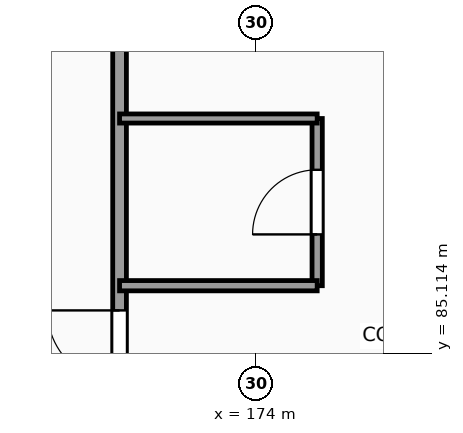
"""IFC4 building model, lengths in metres.
Left out: names, types, materials, properties, quantities, classifications, styles, units other than length and angle.
Written with IfcOpenShell. Run it as: python <this file> out.ifc"""

import sys

from ifc_helpers import new_model, si_unit, direction, frame, frame_2d, origin, place, context, subcontext, project, spatial, rectangle, extrude, element, fill, save


model = new_model("IFC4")
c1 = context("Model", 3, precision=1e-05, world=origin(), true_north=direction((0.0, 1.0)))
c2 = subcontext(c1, "Body", "Model", "MODEL_VIEW")
j1 = project(units=[si_unit("LENGTHUNIT", "METRE"), si_unit("PLANEANGLEUNIT", "RADIAN")], contexts=[c1])
p1 = place(None, origin())
s1 = spatial("IfcSite", under=j1, at=p1, CompositionType="ELEMENT")
p2 = place(p1, origin())
s2 = spatial("IfcBuilding", under=s1, at=p2, CompositionType="ELEMENT")
p3 = place(p2, frame((0.0, 0.0, 24.6)))
s3 = spatial("IfcBuildingStorey", under=s2, at=p3, CompositionType="ELEMENT", Elevation=24.6)
p4 = place(p3, frame((172.2, 42.215, 0.0), z_axis=(0.0, 0.0, 1.0), x_axis=(0.0, 1.0, 0.0)))
e1 = element("IfcWall", 1, at=p4, inside=s3, PredefinedType="PARTITIONING", context=c2, shape_type="SweptSolid", body=[
    extrude(rectangle(XDim=65.605, YDim=0.18, at=frame_2d((32.802, 0.0))), origin(), (0.0, 0.0, 1.0), 3.38),
])
p5 = place(p4, frame((7.61, 0.0, 0.0)))
e2 = element("IfcOpeningElement", 2, at=p5, cuts=e1, PredefinedType="OPENING", context=c2, shape_type="SweptSolid", body=[
    extrude(rectangle(XDim=0.95, YDim=2.1, at=frame_2d((0.475, 1.05))), frame((0.0, 0.1, 0.0), z_axis=(0.0, -1.0, 0.0), x_axis=(1.0, 0.0, 0.0)), (0.0, 0.0, 1.0), 0.2),
])
p6 = place(p4, frame((12.11, 0.0, 0.0)))
e3 = element("IfcOpeningElement", 3, at=p6, cuts=e1, PredefinedType="OPENING", context=c2, shape_type="SweptSolid", body=[
    extrude(rectangle(XDim=0.95, YDim=2.1, at=frame_2d((0.475, 1.05))), frame((0.0, 0.1, 0.0), z_axis=(0.0, -1.0, 0.0), x_axis=(1.0, 0.0, 0.0)), (0.0, 0.0, 1.0), 0.2),
])
p7 = place(p4, frame((16.31, 0.0, 0.0)))
e4 = element("IfcOpeningElement", 4, at=p7, cuts=e1, PredefinedType="OPENING", context=c2, shape_type="SweptSolid", body=[
    extrude(rectangle(XDim=0.95, YDim=2.1, at=frame_2d((0.475, 1.05))), frame((0.0, 0.1, 0.0), z_axis=(0.0, -1.0, 0.0), x_axis=(1.0, 0.0, 0.0)), (0.0, 0.0, 1.0), 0.2),
])
p8 = place(p4, frame((25.61, 0.0, 0.0)))
e5 = element("IfcOpeningElement", 5, at=p8, cuts=e1, PredefinedType="OPENING", context=c2, shape_type="SweptSolid", body=[
    extrude(rectangle(XDim=0.95, YDim=2.1, at=frame_2d((0.475, 1.05))), frame((0.0, 0.1, 0.0), z_axis=(0.0, -1.0, 0.0), x_axis=(1.0, 0.0, 0.0)), (0.0, 0.0, 1.0), 0.2),
])
p9 = place(p4, frame((30.11, 0.0, 0.0)))
e6 = element("IfcOpeningElement", 6, at=p9, cuts=e1, PredefinedType="OPENING", context=c2, shape_type="SweptSolid", body=[
    extrude(rectangle(XDim=0.95, YDim=2.1, at=frame_2d((0.475, 1.05))), frame((0.0, 0.1, 0.0), z_axis=(0.0, -1.0, 0.0), x_axis=(1.0, 0.0, 0.0)), (0.0, 0.0, 1.0), 0.2),
])
p10 = place(p4, frame((34.31, 0.0, 0.0)))
e7 = element("IfcOpeningElement", 7, at=p10, cuts=e1, PredefinedType="OPENING", context=c2, shape_type="SweptSolid", body=[
    extrude(rectangle(XDim=0.95, YDim=2.1, at=frame_2d((0.475, 1.05))), frame((0.0, 0.1, 0.0), z_axis=(0.0, -1.0, 0.0), x_axis=(1.0, 0.0, 0.0)), (0.0, 0.0, 1.0), 0.2),
])
p11 = place(p4, frame((36.51, 0.0, 0.0)))
e8 = element("IfcOpeningElement", 8, at=p11, cuts=e1, PredefinedType="OPENING", context=c2, shape_type="SweptSolid", body=[
    extrude(rectangle(XDim=0.95, YDim=2.1, at=frame_2d((0.475, 1.05))), frame((0.0, 0.1, 0.0), z_axis=(0.0, -1.0, 0.0), x_axis=(1.0, 0.0, 0.0)), (0.0, 0.0, 1.0), 0.2),
])
p12 = place(p4, frame((42.51, 0.0, 0.0)))
e9 = element("IfcOpeningElement", 9, at=p12, cuts=e1, PredefinedType="OPENING", context=c2, shape_type="SweptSolid", body=[
    extrude(rectangle(XDim=0.95, YDim=2.1, at=frame_2d((0.475, 1.05))), frame((0.0, 0.1, 0.0), z_axis=(0.0, -1.0, 0.0), x_axis=(1.0, 0.0, 0.0)), (0.0, 0.0, 1.0), 0.2),
])
p13 = place(p4, frame((52.31, 0.0, 0.0)))
e10 = element("IfcOpeningElement", 10, at=p13, cuts=e1, PredefinedType="OPENING", context=c2, shape_type="SweptSolid", body=[
    extrude(rectangle(XDim=0.95, YDim=2.1, at=frame_2d((0.475, 1.05))), frame((0.0, 0.1, 0.0), z_axis=(0.0, -1.0, 0.0), x_axis=(1.0, 0.0, 0.0)), (0.0, 0.0, 1.0), 0.2),
])
p14 = place(p4, frame((54.51, 0.0, 0.0)))
e11 = element("IfcOpeningElement", 11, at=p14, cuts=e1, PredefinedType="OPENING", context=c2, shape_type="SweptSolid", body=[
    extrude(rectangle(XDim=0.95, YDim=2.1, at=frame_2d((0.475, 1.05))), frame((0.0, 0.1, 0.0), z_axis=(0.0, -1.0, 0.0), x_axis=(1.0, 0.0, 0.0)), (0.0, 0.0, 1.0), 0.2),
])
p15 = place(p4, frame((60.51, 0.0, 0.0)))
e12 = element("IfcOpeningElement", 12, at=p15, cuts=e1, PredefinedType="OPENING", context=c2, shape_type="SweptSolid", body=[
    extrude(rectangle(XDim=0.95, YDim=2.1, at=frame_2d((0.475, 1.05))), frame((0.0, 0.1, 0.0), z_axis=(0.0, -1.0, 0.0), x_axis=(1.0, 0.0, 0.0)), (0.0, 0.0, 1.0), 0.2),
])
p16 = place(p3, frame((174.8, 86.0, 0.0), z_axis=(0.0, 0.0, 1.0), x_axis=(0.0, 1.0, 0.0)))
e13 = element("IfcWall", 13, at=p16, inside=s3, PredefinedType="PARTITIONING", context=c2, shape_type="SweptSolid", body=[
    extrude(rectangle(XDim=2.2, YDim=0.135, at=frame_2d((1.1, 0.0))), origin(), (0.0, 0.0, 1.0), 3.38),
])
p17 = place(p16, frame((0.675, 0.0, 0.0)))
e14 = element("IfcOpeningElement", 14, at=p17, cuts=e13, PredefinedType="OPENING", context=c2, shape_type="SweptSolid", body=[
    extrude(rectangle(XDim=0.85, YDim=2.1, at=frame_2d((0.425, 1.05))), frame((0.0, 0.078, 0.0), z_axis=(0.0, -1.0, 0.0), x_axis=(1.0, 0.0, 0.0)), (0.0, 0.0, 1.0), 0.155),
])
p18 = place(p3, frame((172.2, 86.0, 0.0), z_axis=(0.0, 0.0, 1.0), x_axis=(1.0, 0.0, 0.0)))
e15 = element("IfcWall", 15, at=p18, inside=s3, PredefinedType="PARTITIONING", context=c2, shape_type="SweptSolid", body=[
    extrude(rectangle(XDim=2.6, YDim=0.135, at=frame_2d((1.3, 0.0))), origin(), (0.0, 0.0, 1.0), 3.38),
])
p19 = place(p3, frame((172.2, 88.2, 0.0), z_axis=(0.0, 0.0, 1.0), x_axis=(1.0, 0.0, 0.0)))
e16 = element("IfcWall", 16, at=p19, inside=s3, PredefinedType="PARTITIONING", context=c2, shape_type="SweptSolid", body=[
    extrude(rectangle(XDim=2.6, YDim=0.12, at=frame_2d((1.3, 0.0))), origin(), (0.0, 0.0, 1.0), 3.38),
])
p20 = place(p17, origin())
e17 = element("IfcDoor", 17, at=p20, inside=s3, OperationType="SINGLE_SWING_LEFT", PredefinedType="DOOR", context=c2, shape_type="SweptSolid", body=[
    extrude(rectangle(XDim=0.85, YDim=2.1, at=frame_2d((0.425, 1.05))), frame((0.0, 0.025, 0.0), z_axis=(0.0, -1.0, 0.0), x_axis=(1.0, 0.0, 0.0)), (0.0, 0.0, 1.0), 0.05),
])
fill(e14, e17)
p21 = place(p12, origin())
e18 = element("IfcDoor", 18, at=p21, inside=s3, OperationType="SINGLE_SWING_RIGHT", PredefinedType="DOOR", context=c2, shape_type="SweptSolid", body=[
    extrude(rectangle(XDim=0.95, YDim=2.1, at=frame_2d((0.475, 1.05))), frame((0.0, 0.025, 0.0), z_axis=(0.0, -1.0, 0.0), x_axis=(1.0, 0.0, 0.0)), (0.0, 0.0, 1.0), 0.05),
])
fill(e9, e18)
save(model, sys.argv[1])
